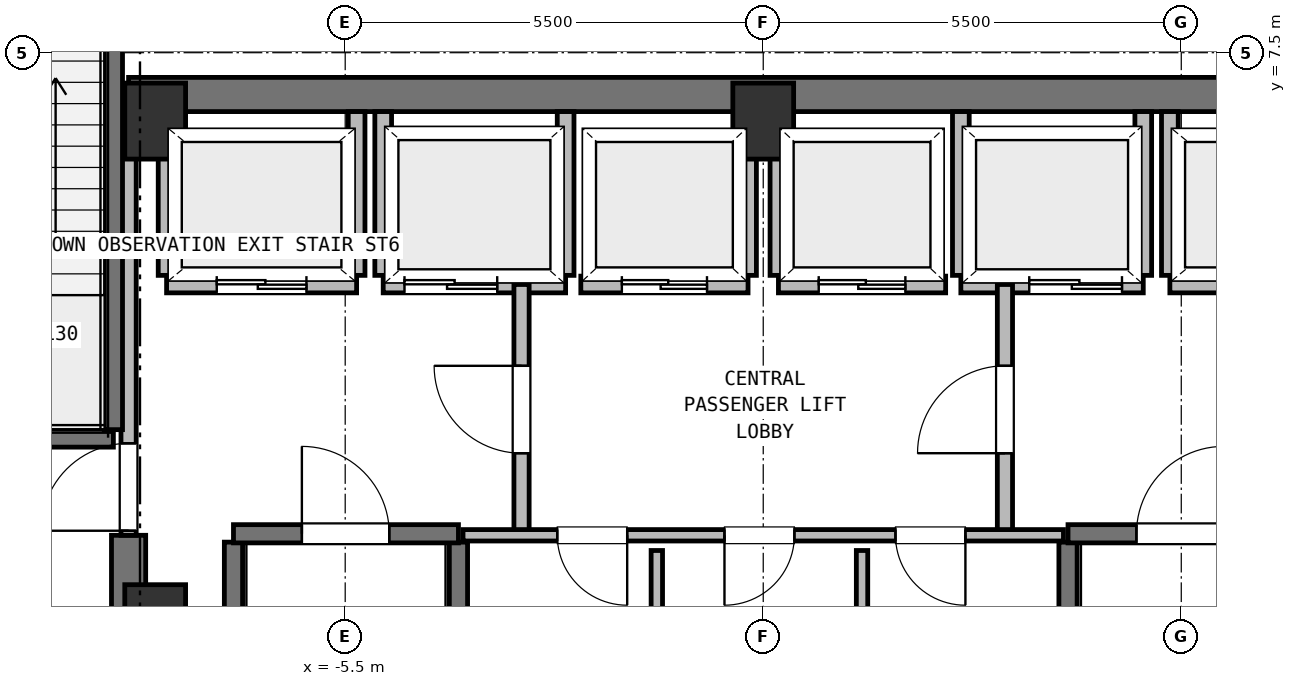
"""IFC4 building model, lengths in metres.
Left out: names, types, materials, properties, quantities, classifications, styles, units other than length and angle.
Written with IfcOpenShell. Run it as: python <this file> out.ifc"""

import sys

from ifc_helpers import new_model, si_unit, direction, frame, frame_2d, origin, origin_2d, place, context, subcontext, project, spatial, rectangle, extrude, element, fill, save


model = new_model("IFC4")
c1 = context("Model", 3, precision=1e-05, world=origin(), true_north=direction((0.0, 1.0)))
c2 = subcontext(c1, "Body", "Model", "MODEL_VIEW")
j1 = project(units=[si_unit("LENGTHUNIT", "METRE"), si_unit("PLANEANGLEUNIT", "RADIAN")], contexts=[c1])
p1 = place(None, origin())
s1 = spatial("IfcSite", under=j1, at=p1, CompositionType="ELEMENT")
p2 = place(p1, origin())
s2 = spatial("IfcBuilding", under=s1, at=p2, CompositionType="ELEMENT")
p3 = place(p2, frame((0.0, 0.0, 281.6)))
s3 = spatial("IfcBuildingStorey", under=s2, at=p3, CompositionType="ELEMENT", Elevation=281.6)
for number, where, z_axis, x_axis in (
    (1, (0.0, 6.6, 0.0), (0.0, 0.0, 1.0), (1.0, 0.0, 0.0)),
    (2, (-8.0, 6.6, 0.0), (0.0, 0.0, 1.0), (1.0, 0.0, 0.0)),
    (3, (-8.0, 0.0, 0.0), (0.0, 0.0, 1.0), (1.0, 0.0, 0.0)),
):
    element("IfcColumn", number, at=place(p3, frame(where, z_axis=z_axis, x_axis=x_axis)), inside=s3, PredefinedType="COLUMN", context=c2, shape_type="SweptSolid", body=[
        extrude(rectangle(XDim=0.8, YDim=1.0, at=origin_2d()), origin(), (0.0, 0.0, 1.0), 4.4),
    ])
p4 = place(p3, frame((-8.35, 6.95, 0.0), z_axis=(0.0, 0.0, 1.0), x_axis=(1.0, 0.0, 0.0)))
e4 = element("IfcWall", 4, at=p4, inside=s3, PredefinedType="SHEAR", context=c2, shape_type="SweptSolid", body=[
    extrude(rectangle(XDim=16.7, YDim=0.45, at=frame_2d((8.35, 0.0))), origin(), (0.0, 0.0, 1.0), 4.13),
])
p5 = place(p3, frame((-8.35, -6.95, 0.0), z_axis=(0.0, 0.0, 1.0), x_axis=(0.0, 1.0, 0.0)))
e5 = element("IfcWall", 5, at=p5, inside=s3, PredefinedType="SHEAR", context=c2, shape_type="SweptSolid", body=[
    extrude(rectangle(XDim=8.1, YDim=0.45, at=frame_2d((4.05, 0.0))), origin(), (0.0, 0.0, 1.0), 4.13),
])
for number, where, z_axis, x_axis in (
    (6, (-6.97, -6.16, 0.0), (0.0, 0.0, 1.0), (0.0, 1.0, 0.0)),
    (7, (-4.01, -6.16, 0.0), (0.0, 0.0, 1.0), (0.0, 1.0, 0.0)),
):
    element("IfcWall", number, at=place(p3, frame(where, z_axis=z_axis, x_axis=x_axis)), inside=s3, PredefinedType="SHEAR", context=c2, shape_type="SweptSolid", body=[
        extrude(rectangle(XDim=7.22, YDim=0.24, at=frame_2d((3.61, 0.0))), origin(), (0.0, 0.0, 1.0), 4.13),
    ])
p6 = place(p3, frame((-6.97, 1.17, 0.0), z_axis=(0.0, 0.0, 1.0), x_axis=(1.0, 0.0, 0.0)))
e8 = element("IfcWall", 8, at=p6, inside=s3, PredefinedType="SHEAR", context=c2, shape_type="SweptSolid", body=[
    extrude(rectangle(XDim=2.96, YDim=0.24, at=frame_2d((1.48, 0.0))), origin(), (0.0, 0.0, 1.0), 4.13),
])
p7 = place(p6, frame((0.9, 0.0, 0.0)))
e9 = element("IfcOpeningElement", 9, at=p7, cuts=e8, PredefinedType="OPENING", context=c2, shape_type="SweptSolid", body=[
    extrude(rectangle(XDim=1.15, YDim=2.15, at=frame_2d((0.575, 1.075))), frame((0.0, 0.13, 0.0), z_axis=(0.0, -1.0, 0.0), x_axis=(1.0, 0.0, 0.0)), (0.0, 0.0, 1.0), 0.26),
])
p8 = place(p3, frame((4.01, -6.16, 0.0), z_axis=(0.0, 0.0, 1.0), x_axis=(0.0, 1.0, 0.0)))
e10 = element("IfcWall", 10, at=p8, inside=s3, PredefinedType="SHEAR", context=c2, shape_type="SweptSolid", body=[
    extrude(rectangle(XDim=7.22, YDim=0.24, at=frame_2d((3.61, 0.0))), origin(), (0.0, 0.0, 1.0), 4.13),
])
p9 = place(p3, frame((4.01, 1.17, 0.0), z_axis=(0.0, 0.0, 1.0), x_axis=(1.0, 0.0, 0.0)))
e11 = element("IfcWall", 11, at=p9, inside=s3, PredefinedType="SHEAR", context=c2, shape_type="SweptSolid", body=[
    extrude(rectangle(XDim=2.96, YDim=0.24, at=frame_2d((1.48, 0.0))), origin(), (0.0, 0.0, 1.0), 4.13),
])
p10 = place(p9, frame((0.9, 0.0, 0.0)))
e12 = element("IfcOpeningElement", 12, at=p10, cuts=e11, PredefinedType="OPENING", context=c2, shape_type="SweptSolid", body=[
    extrude(rectangle(XDim=1.15, YDim=2.15, at=frame_2d((0.575, 1.075))), frame((0.0, 0.13, 0.0), z_axis=(0.0, -1.0, 0.0), x_axis=(1.0, 0.0, 0.0)), (0.0, 0.0, 1.0), 0.26),
])
p11 = place(p3, frame((-7.85, 4.45, 0.0), z_axis=(0.0, 0.0, 1.0), x_axis=(1.0, 0.0, 0.0)))
e13 = element("IfcWall", 13, at=p11, inside=s3, PredefinedType="PARTITIONING", context=c2, shape_type="SweptSolid", body=[
    extrude(rectangle(XDim=2.5, YDim=0.22, at=frame_2d((1.25, 0.0))), origin(), (0.0, 0.0, 1.0), 4.13),
])
p12 = place(p11, frame((0.66, 0.0, 0.0)))
e14 = element("IfcOpeningElement", 14, at=p12, cuts=e13, PredefinedType="OPENING", context=c2, shape_type="SweptSolid", body=[
    extrude(rectangle(XDim=1.18, YDim=2.15, at=frame_2d((0.59, 1.075))), frame((0.0, 0.12, 0.0), z_axis=(0.0, -1.0, 0.0), x_axis=(1.0, 0.0, 0.0)), (0.0, 0.0, 1.0), 0.24),
])
p13 = place(p3, frame((-7.85, 4.57, 0.0), z_axis=(0.0, 0.0, 1.0), x_axis=(0.0, 1.0, 0.0)))
e15 = element("IfcWall", 15, at=p13, inside=s3, PredefinedType="PARTITIONING", context=c2, shape_type="SweptSolid", body=[
    extrude(rectangle(XDim=2.155, YDim=0.22, at=frame_2d((1.078, 0.0))), origin(), (0.0, 0.0, 1.0), 3.81),
])
p14 = place(p3, frame((-5.35, 4.57, 0.0), z_axis=(0.0, 0.0, 1.0), x_axis=(0.0, 1.0, 0.0)))
e16 = element("IfcWall", 16, at=p14, inside=s3, PredefinedType="PARTITIONING", context=c2, shape_type="SweptSolid", body=[
    extrude(rectangle(XDim=2.155, YDim=0.22, at=frame_2d((1.078, 0.0))), origin(), (0.0, 0.0, 1.0), 4.13),
])
p15 = place(p3, frame((5.35, 4.45, 0.0), z_axis=(0.0, 0.0, 1.0), x_axis=(1.0, 0.0, 0.0)))
e17 = element("IfcWall", 17, at=p15, inside=s3, PredefinedType="PARTITIONING", context=c2, shape_type="SweptSolid", body=[
    extrude(rectangle(XDim=2.5, YDim=0.22, at=frame_2d((1.25, 0.0))), origin(), (0.0, 0.0, 1.0), 4.13),
])
p16 = place(p15, frame((0.66, 0.0, 0.0)))
e18 = element("IfcOpeningElement", 18, at=p16, cuts=e17, PredefinedType="OPENING", context=c2, shape_type="SweptSolid", body=[
    extrude(rectangle(XDim=1.18, YDim=2.15, at=frame_2d((0.59, 1.075))), frame((0.0, 0.12, 0.0), z_axis=(0.0, -1.0, 0.0), x_axis=(1.0, 0.0, 0.0)), (0.0, 0.0, 1.0), 0.24),
])
p17 = place(p3, frame((5.35, 4.57, 0.0), z_axis=(0.0, 0.0, 1.0), x_axis=(0.0, 1.0, 0.0)))
e19 = element("IfcWall", 19, at=p17, inside=s3, PredefinedType="PARTITIONING", context=c2, shape_type="SweptSolid", body=[
    extrude(rectangle(XDim=2.155, YDim=0.22, at=frame_2d((1.078, 0.0))), origin(), (0.0, 0.0, 1.0), 4.13),
])
p18 = place(p3, frame((-5.0, 4.45, 0.0), z_axis=(0.0, 0.0, 1.0), x_axis=(1.0, 0.0, 0.0)))
e20 = element("IfcWall", 20, at=p18, inside=s3, PredefinedType="PARTITIONING", context=c2, shape_type="SweptSolid", body=[
    extrude(rectangle(XDim=2.4, YDim=0.22, at=frame_2d((1.2, 0.0))), origin(), (0.0, 0.0, 1.0), 4.13),
])
p19 = place(p18, frame((0.28, 0.0, 0.0)))
e21 = element("IfcOpeningElement", 21, at=p19, cuts=e20, PredefinedType="OPENING", context=c2, shape_type="SweptSolid", body=[
    extrude(rectangle(XDim=1.22, YDim=2.15, at=frame_2d((0.61, 1.075))), frame((0.0, 0.12, 0.0), z_axis=(0.0, -1.0, 0.0), x_axis=(1.0, 0.0, 0.0)), (0.0, 0.0, 1.0), 0.24),
])
for number, where, z_axis, x_axis in (
    (22, (-5.0, 4.57, 0.0), (0.0, 0.0, 1.0), (0.0, 1.0, 0.0)),
    (23, (-2.6, 4.57, 0.0), (0.0, 0.0, 1.0), (0.0, 1.0, 0.0)),
):
    element("IfcWall", number, at=place(p3, frame(where, z_axis=z_axis, x_axis=x_axis)), inside=s3, PredefinedType="PARTITIONING", context=c2, shape_type="SweptSolid", body=[
        extrude(rectangle(XDim=2.155, YDim=0.22, at=frame_2d((1.078, 0.0))), origin(), (0.0, 0.0, 1.0), 4.13),
    ])
p20 = place(p3, frame((2.6, 4.45, 0.0), z_axis=(0.0, 0.0, 1.0), x_axis=(1.0, 0.0, 0.0)))
e24 = element("IfcWall", 24, at=p20, inside=s3, PredefinedType="PARTITIONING", context=c2, shape_type="SweptSolid", body=[
    extrude(rectangle(XDim=2.4, YDim=0.22, at=frame_2d((1.2, 0.0))), origin(), (0.0, 0.0, 1.0), 4.13),
])
p21 = place(p20, frame((0.9, 0.0, 0.0)))
e25 = element("IfcOpeningElement", 25, at=p21, cuts=e24, PredefinedType="OPENING", context=c2, shape_type="SweptSolid", body=[
    extrude(rectangle(XDim=1.22, YDim=2.15, at=frame_2d((0.61, 1.075))), frame((0.0, 0.12, 0.0), z_axis=(0.0, -1.0, 0.0), x_axis=(1.0, 0.0, 0.0)), (0.0, 0.0, 1.0), 0.24),
])
for number, where, z_axis, x_axis in (
    (26, (2.6, 4.57, 0.0), (0.0, 0.0, 1.0), (0.0, 1.0, 0.0)),
    (27, (5.0, 4.57, 0.0), (0.0, 0.0, 1.0), (0.0, 1.0, 0.0)),
):
    element("IfcWall", number, at=place(p3, frame(where, z_axis=z_axis, x_axis=x_axis)), inside=s3, PredefinedType="PARTITIONING", context=c2, shape_type="SweptSolid", body=[
        extrude(rectangle(XDim=2.155, YDim=0.22, at=frame_2d((1.078, 0.0))), origin(), (0.0, 0.0, 1.0), 4.13),
    ])
p22 = place(p3, frame((-2.4, 4.45, 0.0), z_axis=(0.0, 0.0, 1.0), x_axis=(1.0, 0.0, 0.0)))
e28 = element("IfcWall", 28, at=p22, inside=s3, PredefinedType="PARTITIONING", context=c2, shape_type="SweptSolid", body=[
    extrude(rectangle(XDim=2.2, YDim=0.22, at=frame_2d((1.1, 0.0))), origin(), (0.0, 0.0, 1.0), 4.13),
])
p23 = place(p22, frame((0.54, 0.0, 0.0)))
e29 = element("IfcOpeningElement", 29, at=p23, cuts=e28, PredefinedType="OPENING", context=c2, shape_type="SweptSolid", body=[
    extrude(rectangle(XDim=1.12, YDim=2.15, at=frame_2d((0.56, 1.075))), frame((0.0, 0.12, 0.0), z_axis=(0.0, -1.0, 0.0), x_axis=(1.0, 0.0, 0.0)), (0.0, 0.0, 1.0), 0.24),
])
p24 = place(p3, frame((-0.2, 4.57, 0.0), z_axis=(0.0, 0.0, 1.0), x_axis=(0.0, 1.0, 0.0)))
e30 = element("IfcWall", 30, at=p24, inside=s3, PredefinedType="PARTITIONING", context=c2, shape_type="SweptSolid", body=[
    extrude(rectangle(XDim=2.155, YDim=0.22, at=frame_2d((1.078, 0.0))), origin(), (0.0, 0.0, 1.0), 4.13),
])
p25 = place(p3, frame((0.2, 4.45, 0.0), z_axis=(0.0, 0.0, 1.0), x_axis=(1.0, 0.0, 0.0)))
e31 = element("IfcWall", 31, at=p25, inside=s3, PredefinedType="PARTITIONING", context=c2, shape_type="SweptSolid", body=[
    extrude(rectangle(XDim=2.2, YDim=0.22, at=frame_2d((1.1, 0.0))), origin(), (0.0, 0.0, 1.0), 4.13),
])
p26 = place(p25, frame((0.53, 0.0, 0.0)))
e32 = element("IfcOpeningElement", 32, at=p26, cuts=e31, PredefinedType="OPENING", context=c2, shape_type="SweptSolid", body=[
    extrude(rectangle(XDim=1.14, YDim=2.15, at=frame_2d((0.57, 1.075))), frame((0.0, 0.12, 0.0), z_axis=(0.0, -1.0, 0.0), x_axis=(1.0, 0.0, 0.0)), (0.0, 0.0, 1.0), 0.24),
])
p27 = place(p3, frame((0.2, 4.57, 0.0), z_axis=(0.0, 0.0, 1.0), x_axis=(0.0, 1.0, 0.0)))
e33 = element("IfcWall", 33, at=p27, inside=s3, PredefinedType="PARTITIONING", context=c2, shape_type="SweptSolid", body=[
    extrude(rectangle(XDim=2.155, YDim=0.22, at=frame_2d((1.078, 0.0))), origin(), (0.0, 0.0, 1.0), 4.13),
])
p28 = place(p3, frame((-3.18, 1.15, 0.0), z_axis=(0.0, 0.0, 1.0), x_axis=(0.0, 1.0, 0.0)))
e34 = element("IfcWall", 34, at=p28, inside=s3, PredefinedType="PARTITIONING", context=c2, shape_type="SweptSolid", body=[
    extrude(rectangle(XDim=3.3, YDim=0.2, at=frame_2d((1.65, 0.0))), origin(), (0.0, 0.0, 1.0), 4.13),
])
p29 = place(p28, frame((1.08, 0.0, 0.0)))
e35 = element("IfcOpeningElement", 35, at=p29, cuts=e34, PredefinedType="OPENING", context=c2, shape_type="SweptSolid", body=[
    extrude(rectangle(XDim=1.15, YDim=2.15, at=frame_2d((0.575, 1.075))), frame((0.0, 0.11, 0.0), z_axis=(0.0, -1.0, 0.0), x_axis=(1.0, 0.0, 0.0)), (0.0, 0.0, 1.0), 0.22),
])
p30 = place(p3, frame((3.18, 1.15, 0.0), z_axis=(0.0, 0.0, 1.0), x_axis=(0.0, 1.0, 0.0)))
e36 = element("IfcWall", 36, at=p30, inside=s3, PredefinedType="PARTITIONING", context=c2, shape_type="SweptSolid", body=[
    extrude(rectangle(XDim=3.3, YDim=0.2, at=frame_2d((1.65, 0.0))), origin(), (0.0, 0.0, 1.0), 4.13),
])
p31 = place(p30, frame((1.08, 0.0, 0.0)))
e37 = element("IfcOpeningElement", 37, at=p31, cuts=e36, PredefinedType="OPENING", context=c2, shape_type="SweptSolid", body=[
    extrude(rectangle(XDim=1.15, YDim=2.15, at=frame_2d((0.575, 1.075))), frame((0.0, 0.11, 0.0), z_axis=(0.0, -1.0, 0.0), x_axis=(1.0, 0.0, 0.0)), (0.0, 0.0, 1.0), 0.22),
])
p32 = place(p3, frame((-8.35, 1.15, 0.0), z_axis=(0.0, 0.0, 1.0), x_axis=(0.0, 1.0, 0.0)))
e38 = element("IfcWall", 38, at=p32, inside=s3, PredefinedType="PARTITIONING", context=c2, shape_type="SweptSolid", body=[
    extrude(rectangle(XDim=5.4, YDim=0.2, at=frame_2d((2.7, 0.0))), origin(), (0.0, 0.0, 1.0), 4.13),
])
p33 = place(p32, frame((0.06, 0.0, 0.0)))
e39 = element("IfcOpeningElement", 39, at=p33, cuts=e38, PredefinedType="OPENING", context=c2, shape_type="SweptSolid", body=[
    extrude(rectangle(XDim=1.15, YDim=2.15, at=frame_2d((0.575, 1.075))), frame((0.0, 0.11, 0.0), z_axis=(0.0, -1.0, 0.0), x_axis=(1.0, 0.0, 0.0)), (0.0, 0.0, 1.0), 0.22),
])
p34 = place(p3, frame((3.95, 1.15, 0.0), z_axis=(0.0, 0.0, 1.0), x_axis=(-1.0, 0.0, 0.0)))
e40 = element("IfcWall", 40, at=p34, inside=s3, PredefinedType="PARTITIONING", context=c2, shape_type="SweptSolid", body=[
    extrude(rectangle(XDim=7.9, YDim=0.15, at=frame_2d((3.95, 0.0))), origin(), (0.0, 0.0, 1.0), 4.13),
])
p35 = place(p34, frame((5.74, 0.0, 0.0)))
e41 = element("IfcOpeningElement", 41, at=p35, cuts=e40, PredefinedType="OPENING", context=c2, shape_type="SweptSolid", body=[
    extrude(rectangle(XDim=0.92, YDim=2.05, at=frame_2d((0.46, 1.025))), frame((0.0, 0.085, 0.0), z_axis=(0.0, -1.0, 0.0), x_axis=(1.0, 0.0, 0.0)), (0.0, 0.0, 1.0), 0.17),
])
p36 = place(p34, frame((3.54, 0.0, 0.0)))
e42 = element("IfcOpeningElement", 42, at=p36, cuts=e40, PredefinedType="OPENING", context=c2, shape_type="SweptSolid", body=[
    extrude(rectangle(XDim=0.92, YDim=2.05, at=frame_2d((0.46, 1.025))), frame((0.0, 0.085, 0.0), z_axis=(0.0, -1.0, 0.0), x_axis=(1.0, 0.0, 0.0)), (0.0, 0.0, 1.0), 0.17),
])
p37 = place(p34, frame((1.29, 0.0, 0.0)))
e43 = element("IfcOpeningElement", 43, at=p37, cuts=e40, PredefinedType="OPENING", context=c2, shape_type="SweptSolid", body=[
    extrude(rectangle(XDim=0.92, YDim=2.05, at=frame_2d((0.46, 1.025))), frame((0.0, 0.085, 0.0), z_axis=(0.0, -1.0, 0.0), x_axis=(1.0, 0.0, 0.0)), (0.0, 0.0, 1.0), 0.17),
])
for number, where, z_axis, x_axis in (
    (44, (-1.4, -6.58, 0.0), (0.0, 0.0, 1.0), (0.0, 1.0, 0.0)),
    (45, (1.3, -6.58, 0.0), (0.0, 0.0, 1.0), (0.0, 1.0, 0.0)),
):
    element("IfcWall", number, at=place(p3, frame(where, z_axis=z_axis, x_axis=x_axis)), inside=s3, PredefinedType="PARTITIONING", context=c2, shape_type="SweptSolid", body=[
        extrude(rectangle(XDim=7.53, YDim=0.15, at=frame_2d((3.765, 0.0))), origin(), (0.0, 0.0, 1.0), 4.13),
    ])
p38 = place(p3, frame((-11.51, 2.43, 0.0), z_axis=(0.0, 0.0, 1.0), x_axis=(1.0, 0.0, 0.0)))
e46 = element("IfcWall", 46, at=p38, inside=s3, PredefinedType="SHEAR", context=c2, shape_type="SweptSolid", body=[
    extrude(rectangle(XDim=2.96, YDim=0.24, at=frame_2d((1.48, 0.0))), origin(), (0.0, 0.0, 1.0), 4.13),
])
p39 = place(p3, frame((-8.55, 2.54, 0.0), z_axis=(0.0, 0.0, 1.0), x_axis=(0.0, 1.0, 0.0)))
e47 = element("IfcWall", 47, at=p39, inside=s3, PredefinedType="SHEAR", context=c2, shape_type="SweptSolid", body=[
    extrude(rectangle(XDim=6.42, YDim=0.24, at=frame_2d((3.21, 0.0))), origin(), (0.0, 0.0, 1.0), 4.13),
])
p40 = place(p7, origin())
e48 = element("IfcDoor", 48, at=p40, inside=s3, OperationType="SINGLE_SWING_LEFT", PredefinedType="DOOR", context=c2, shape_type="SweptSolid", body=[
    extrude(rectangle(XDim=1.15, YDim=2.15, at=frame_2d((0.575, 1.075))), frame((0.0, 0.025, 0.0), z_axis=(0.0, -1.0, 0.0), x_axis=(1.0, 0.0, 0.0)), (0.0, 0.0, 1.0), 0.05),
])
fill(e9, e48)
p41 = place(p10, origin())
e49 = element("IfcDoor", 49, at=p41, inside=s3, OperationType="SINGLE_SWING_RIGHT", PredefinedType="DOOR", context=c2, shape_type="SweptSolid", body=[
    extrude(rectangle(XDim=1.15, YDim=2.15, at=frame_2d((0.575, 1.075))), frame((0.0, 0.025, 0.0), z_axis=(0.0, -1.0, 0.0), x_axis=(1.0, 0.0, 0.0)), (0.0, 0.0, 1.0), 0.05),
])
fill(e12, e49)
p42 = place(p12, origin())
e50 = element("IfcDoor", 50, at=p42, inside=s3, OperationType="DOUBLE_DOOR_SLIDING", PredefinedType="DOOR", context=c2, shape_type="SweptSolid", body=[
    extrude(rectangle(XDim=1.18, YDim=2.15, at=frame_2d((0.59, 1.075))), frame((0.0, 0.025, 0.0), z_axis=(0.0, -1.0, 0.0), x_axis=(1.0, 0.0, 0.0)), (0.0, 0.0, 1.0), 0.05),
])
fill(e14, e50)
p43 = place(p19, origin())
e51 = element("IfcDoor", 51, at=p43, inside=s3, OperationType="DOUBLE_DOOR_SLIDING", PredefinedType="DOOR", context=c2, shape_type="SweptSolid", body=[
    extrude(rectangle(XDim=1.22, YDim=2.15, at=frame_2d((0.61, 1.075))), frame((0.0, 0.025, 0.0), z_axis=(0.0, -1.0, 0.0), x_axis=(1.0, 0.0, 0.0)), (0.0, 0.0, 1.0), 0.05),
])
fill(e21, e51)
p44 = place(p21, origin())
e52 = element("IfcDoor", 52, at=p44, inside=s3, OperationType="DOUBLE_DOOR_SLIDING", PredefinedType="DOOR", context=c2, shape_type="SweptSolid", body=[
    extrude(rectangle(XDim=1.22, YDim=2.15, at=frame_2d((0.61, 1.075))), frame((0.0, 0.025, 0.0), z_axis=(0.0, -1.0, 0.0), x_axis=(1.0, 0.0, 0.0)), (0.0, 0.0, 1.0), 0.05),
])
fill(e25, e52)
p45 = place(p23, origin())
e53 = element("IfcDoor", 53, at=p45, inside=s3, OperationType="DOUBLE_DOOR_SLIDING", PredefinedType="DOOR", context=c2, shape_type="SweptSolid", body=[
    extrude(rectangle(XDim=1.12, YDim=2.15, at=frame_2d((0.56, 1.075))), frame((0.0, 0.025, 0.0), z_axis=(0.0, -1.0, 0.0), x_axis=(1.0, 0.0, 0.0)), (0.0, 0.0, 1.0), 0.05),
])
fill(e29, e53)
p46 = place(p26, origin())
e54 = element("IfcDoor", 54, at=p46, inside=s3, OperationType="DOUBLE_DOOR_SLIDING", PredefinedType="DOOR", context=c2, shape_type="SweptSolid", body=[
    extrude(rectangle(XDim=1.14, YDim=2.15, at=frame_2d((0.57, 1.075))), frame((0.0, 0.025, 0.0), z_axis=(0.0, -1.0, 0.0), x_axis=(1.0, 0.0, 0.0)), (0.0, 0.0, 1.0), 0.05),
])
fill(e32, e54)
p47 = place(p29, origin())
e55 = element("IfcDoor", 55, at=p47, inside=s3, OperationType="SINGLE_SWING_RIGHT", PredefinedType="DOOR", context=c2, shape_type="SweptSolid", body=[
    extrude(rectangle(XDim=1.15, YDim=2.15, at=frame_2d((0.575, 1.075))), frame((0.0, 0.025, 0.0), z_axis=(0.0, -1.0, 0.0), x_axis=(1.0, 0.0, 0.0)), (0.0, 0.0, 1.0), 0.05),
])
fill(e35, e55)
p48 = place(p31, origin())
e56 = element("IfcDoor", 56, at=p48, inside=s3, OperationType="SINGLE_SWING_LEFT", PredefinedType="DOOR", context=c2, shape_type="SweptSolid", body=[
    extrude(rectangle(XDim=1.15, YDim=2.15, at=frame_2d((0.575, 1.075))), frame((0.0, 0.025, 0.0), z_axis=(0.0, -1.0, 0.0), x_axis=(1.0, 0.0, 0.0)), (0.0, 0.0, 1.0), 0.05),
])
fill(e37, e56)
p49 = place(p33, origin())
e57 = element("IfcDoor", 57, at=p49, inside=s3, OperationType="SINGLE_SWING_LEFT", PredefinedType="DOOR", context=c2, shape_type="SweptSolid", body=[
    extrude(rectangle(XDim=1.15, YDim=2.15, at=frame_2d((0.575, 1.075))), frame((0.0, 0.025, 0.0), z_axis=(0.0, -1.0, 0.0), x_axis=(1.0, 0.0, 0.0)), (0.0, 0.0, 1.0), 0.05),
])
fill(e39, e57)
p50 = place(p35, origin())
e58 = element("IfcDoor", 58, at=p50, inside=s3, OperationType="SINGLE_SWING_LEFT", PredefinedType="DOOR", context=c2, shape_type="SweptSolid", body=[
    extrude(rectangle(XDim=0.92, YDim=2.05, at=frame_2d((0.46, 1.025))), frame((0.0, 0.025, 0.0), z_axis=(0.0, -1.0, 0.0), x_axis=(1.0, 0.0, 0.0)), (0.0, 0.0, 1.0), 0.05),
])
fill(e41, e58)
p51 = place(p36, origin())
e59 = element("IfcDoor", 59, at=p51, inside=s3, OperationType="SINGLE_SWING_RIGHT", PredefinedType="DOOR", context=c2, shape_type="SweptSolid", body=[
    extrude(rectangle(XDim=0.92, YDim=2.05, at=frame_2d((0.46, 1.025))), frame((0.0, 0.025, 0.0), z_axis=(0.0, -1.0, 0.0), x_axis=(1.0, 0.0, 0.0)), (0.0, 0.0, 1.0), 0.05),
])
fill(e42, e59)
p52 = place(p37, origin())
e60 = element("IfcDoor", 60, at=p52, inside=s3, OperationType="SINGLE_SWING_LEFT", PredefinedType="DOOR", context=c2, shape_type="SweptSolid", body=[
    extrude(rectangle(XDim=0.92, YDim=2.05, at=frame_2d((0.46, 1.025))), frame((0.0, 0.025, 0.0), z_axis=(0.0, -1.0, 0.0), x_axis=(1.0, 0.0, 0.0)), (0.0, 0.0, 1.0), 0.05),
])
fill(e43, e60)
save(model, sys.argv[1])
